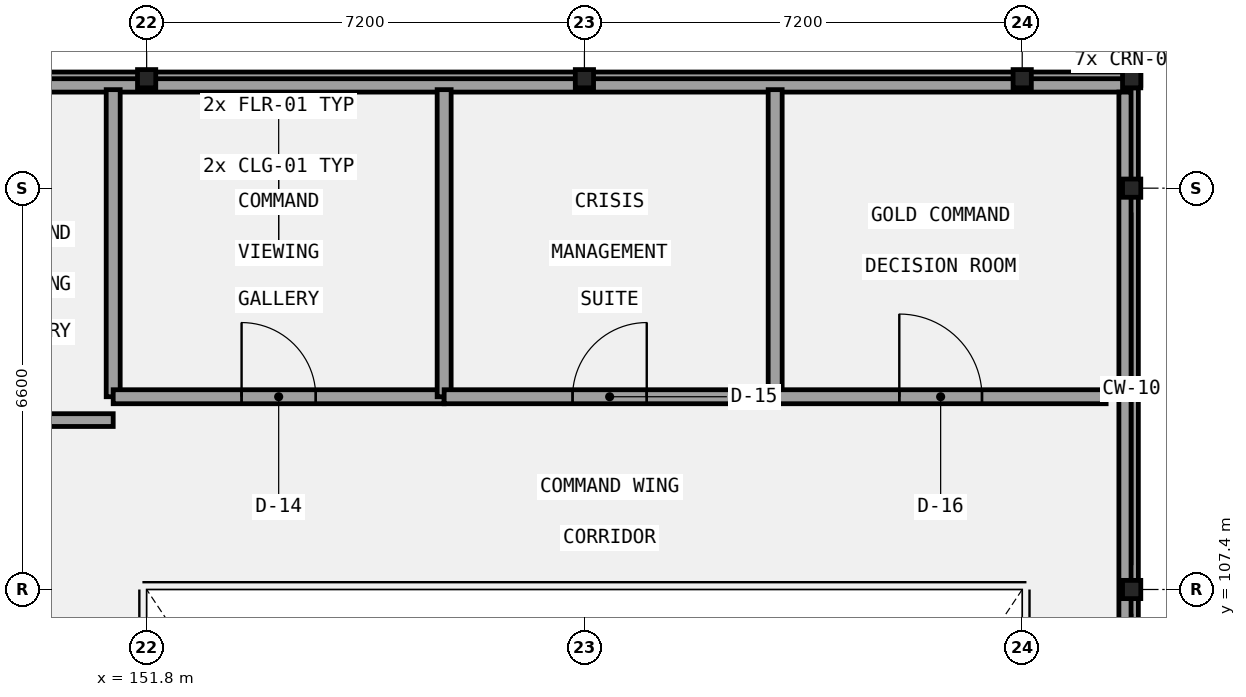
"""IFC4 building model, lengths in metres.
Left out: names, types, materials, properties, quantities, classifications, styles, units other than length and angle.
Written with IfcOpenShell. Run it as: python <this file> out.ifc"""

import sys

from ifc_helpers import new_model, si_unit, direction, frame, frame_2d, origin, origin_2d, place, context, subcontext, project, spatial, rectangle, i_section, extrude, element, fill, save


model = new_model("IFC4")
c1 = context("Model", 3, precision=1e-05, world=origin(), true_north=direction((0.0, 1.0)))
c2 = subcontext(c1, "Body", "Model", "MODEL_VIEW")
j1 = project(units=[si_unit("LENGTHUNIT", "METRE"), si_unit("PLANEANGLEUNIT", "RADIAN")], contexts=[c1])
p1 = place(None, origin())
s1 = spatial("IfcSite", under=j1, at=p1, CompositionType="ELEMENT")
p2 = place(p1, origin())
s2 = spatial("IfcBuilding", under=s1, at=p2, CompositionType="ELEMENT")
p3 = place(p2, frame((0.0, 0.0, 30.9)))
s3 = spatial("IfcBuildingStorey", under=s2, at=p3, CompositionType="ELEMENT", Elevation=30.9)
for number, where, z_axis, x_axis in (
    (1, (168.0, 107.4, 0.0), (0.0, 0.0, 1.0), (1.0, 0.0, 0.0)),
    (2, (168.0, 114.0, 0.0), (0.0, 0.0, 1.0), (1.0, 0.0, 0.0)),
    (3, (168.0, 115.8, 0.0), (0.0, 0.0, 1.0), (1.0, 0.0, 0.0)),
    (4, (166.2, 115.8, 0.0), (0.0, 0.0, 1.0), (1.0, 0.0, 0.0)),
    (5, (159.0, 115.8, 0.0), (0.0, 0.0, 1.0), (1.0, 0.0, 0.0)),
    (6, (151.8, 115.8, 0.0), (0.0, 0.0, 1.0), (1.0, 0.0, 0.0)),
):
    element("IfcColumn", number, at=place(p3, frame(where, z_axis=z_axis, x_axis=x_axis)), inside=s3, PredefinedType="COLUMN", context=c2, shape_type="SweptSolid", body=[
        extrude(i_section(OverallWidth=0.3, OverallDepth=0.3, WebThickness=0.011, FlangeThickness=0.019, FilletRadius=0.027, at=origin_2d()), origin(), (0.0, 0.0, 1.0), 4.5),
    ])
p4 = place(p3, frame((168.0, 78.75, 0.0), z_axis=(0.0, 0.0, 1.0), x_axis=(0.0, 1.0, 0.0)))
e7 = element("IfcWall", 7, at=p4, inside=s3, PredefinedType="PARAPET", context=c2, shape_type="SweptSolid", body=[
    extrude(rectangle(XDim=36.9, YDim=0.22, at=frame_2d((18.45, 0.0))), origin(), (0.0, 0.0, 1.0), 0.45),
])
p5 = place(p3, frame((168.15, 115.8, 0.0), z_axis=(0.0, 0.0, 1.0), x_axis=(-1.0, 0.0, 0.0)))
e8 = element("IfcWall", 8, at=p5, inside=s3, PredefinedType="PARAPET", context=c2, shape_type="SweptSolid", body=[
    extrude(rectangle(XDim=23.7, YDim=0.22, at=frame_2d((11.85, 0.0))), origin(), (0.0, 0.0, 1.0), 0.45),
])
p6 = place(p3, frame((144.71, 115.69, 4.5), z_axis=(0.0, 0.0, 1.0), x_axis=(1.0, 0.0, 0.0)))
e9 = element("IfcWall", 9, at=p6, inside=s3, PredefinedType="PARAPET", context=c2, shape_type="SweptSolid", body=[
    extrude(rectangle(XDim=23.18, YDim=0.22, at=frame_2d((11.59, 0.0))), origin(), (0.0, 0.0, 1.0), 1.12),
])
p7 = place(p3, frame((167.89, 115.58, 4.5), z_axis=(0.0, 0.0, 1.0), x_axis=(0.0, -1.0, 0.0)))
e10 = element("IfcWall", 10, at=p7, inside=s3, PredefinedType="PARAPET", context=c2, shape_type="SweptSolid", body=[
    extrude(rectangle(XDim=36.76, YDim=0.2, at=frame_2d((18.38, 0.0))), origin(), (0.0, 0.0, 1.0), 1.12),
])
p8 = place(p3, frame((147.87, 110.186, 0.0), z_axis=(0.0, 0.0, 1.0), x_axis=(1.0, 0.0, 0.0)))
e11 = element("IfcWall", 11, at=p8, inside=s3, PredefinedType="PARTITIONING", context=c2, shape_type="SweptSolid", body=[
    extrude(rectangle(XDim=3.38, YDim=0.21, at=frame_2d((1.69, 0.0))), origin(), (0.0, 0.0, 1.0), 4.25),
])
p9 = place(p3, frame((151.25, 110.57, 0.0), z_axis=(0.0, 0.0, 1.0), x_axis=(0.0, 1.0, 0.0)))
e12 = element("IfcWall", 12, at=p9, inside=s3, PredefinedType="PARTITIONING", context=c2, shape_type="SweptSolid", body=[
    extrude(rectangle(XDim=5.05, YDim=0.23, at=frame_2d((2.525, 0.0))), origin(), (0.0, 0.0, 1.0), 4.25),
])
p10 = place(p3, frame((151.25, 110.57, 0.0), z_axis=(0.0, 0.0, 1.0), x_axis=(1.0, 0.0, 0.0)))
e13 = element("IfcWall", 13, at=p10, inside=s3, PredefinedType="PARTITIONING", context=c2, shape_type="SweptSolid", body=[
    extrude(rectangle(XDim=5.443, YDim=0.23, at=frame_2d((2.722, 0.0))), origin(), (0.0, 0.0, 1.0), 4.25),
])
p11 = place(p10, frame((2.112, 0.0, 0.0)))
e14 = element("IfcOpeningElement", 14, at=p11, cuts=e13, PredefinedType="OPENING", context=c2, shape_type="SweptSolid", body=[
    extrude(rectangle(XDim=1.22, YDim=2.22, at=frame_2d((0.61, 1.11))), frame((0.0, 0.125, 0.0), z_axis=(0.0, -1.0, 0.0), x_axis=(1.0, 0.0, 0.0)), (0.0, 0.0, 1.0), 0.25),
])
p12 = place(p3, frame((156.693, 110.57, 0.0), z_axis=(0.0, 0.0, 1.0), x_axis=(0.0, 1.0, 0.0)))
e15 = element("IfcWall", 15, at=p12, inside=s3, PredefinedType="PARTITIONING", context=c2, shape_type="SweptSolid", body=[
    extrude(rectangle(XDim=5.05, YDim=0.23, at=frame_2d((2.525, 0.0))), origin(), (0.0, 0.0, 1.0), 4.25),
])
p13 = place(p3, frame((156.693, 110.57, 0.0), z_axis=(0.0, 0.0, 1.0), x_axis=(1.0, 0.0, 0.0)))
e16 = element("IfcWall", 16, at=p13, inside=s3, PredefinedType="PARTITIONING", context=c2, shape_type="SweptSolid", body=[
    extrude(rectangle(XDim=5.444, YDim=0.23, at=frame_2d((2.722, 0.0))), origin(), (0.0, 0.0, 1.0), 4.25),
])
p14 = place(p13, frame((2.112, 0.0, 0.0)))
e17 = element("IfcOpeningElement", 17, at=p14, cuts=e16, PredefinedType="OPENING", context=c2, shape_type="SweptSolid", body=[
    extrude(rectangle(XDim=1.22, YDim=2.35, at=frame_2d((0.61, 1.175))), frame((0.0, 0.125, 0.0), z_axis=(0.0, -1.0, 0.0), x_axis=(1.0, 0.0, 0.0)), (0.0, 0.0, 1.0), 0.25),
])
p15 = place(p3, frame((162.137, 110.57, 0.0), z_axis=(0.0, 0.0, 1.0), x_axis=(0.0, 1.0, 0.0)))
e18 = element("IfcWall", 18, at=p15, inside=s3, PredefinedType="PARTITIONING", context=c2, shape_type="SweptSolid", body=[
    extrude(rectangle(XDim=5.05, YDim=0.23, at=frame_2d((2.525, 0.0))), origin(), (0.0, 0.0, 1.0), 4.25),
])
p16 = place(p3, frame((162.137, 110.57, 0.0), z_axis=(0.0, 0.0, 1.0), x_axis=(1.0, 0.0, 0.0)))
e19 = element("IfcWall", 19, at=p16, inside=s3, PredefinedType="PARTITIONING", context=c2, shape_type="SweptSolid", body=[
    extrude(rectangle(XDim=5.443, YDim=0.23, at=frame_2d((2.722, 0.0))), origin(), (0.0, 0.0, 1.0), 4.25),
])
p17 = place(p16, frame((2.042, 0.0, 0.0)))
e20 = element("IfcOpeningElement", 20, at=p17, cuts=e19, PredefinedType="OPENING", context=c2, shape_type="SweptSolid", body=[
    extrude(rectangle(XDim=1.36, YDim=2.1, at=frame_2d((0.68, 1.05))), frame((0.0, 0.125, 0.0), z_axis=(0.0, -1.0, 0.0), x_axis=(1.0, 0.0, 0.0)), (0.0, 0.0, 1.0), 0.25),
])
p18 = place(p11, origin())
e21 = element("IfcDoor", 21, at=p18, inside=s3, OperationType="SINGLE_SWING_LEFT", PredefinedType="DOOR", context=c2, shape_type="SweptSolid", body=[
    extrude(rectangle(XDim=1.22, YDim=2.22, at=frame_2d((0.61, 1.11))), frame((0.0, 0.025, 0.0), z_axis=(0.0, -1.0, 0.0), x_axis=(1.0, 0.0, 0.0)), (0.0, 0.0, 1.0), 0.05),
])
fill(e14, e21)
p19 = place(p14, origin())
e22 = element("IfcDoor", 22, at=p19, inside=s3, OperationType="SINGLE_SWING_RIGHT", PredefinedType="DOOR", context=c2, shape_type="SweptSolid", body=[
    extrude(rectangle(XDim=1.22, YDim=2.35, at=frame_2d((0.61, 1.175))), frame((0.0, 0.025, 0.0), z_axis=(0.0, -1.0, 0.0), x_axis=(1.0, 0.0, 0.0)), (0.0, 0.0, 1.0), 0.05),
])
fill(e17, e22)
p20 = place(p17, origin())
e23 = element("IfcDoor", 23, at=p20, inside=s3, OperationType="SINGLE_SWING_LEFT", PredefinedType="DOOR", context=c2, shape_type="SweptSolid", body=[
    extrude(rectangle(XDim=1.36, YDim=2.1, at=frame_2d((0.68, 1.05))), frame((0.0, 0.025, 0.0), z_axis=(0.0, -1.0, 0.0), x_axis=(1.0, 0.0, 0.0)), (0.0, 0.0, 1.0), 0.05),
])
fill(e20, e23)
save(model, sys.argv[1])
